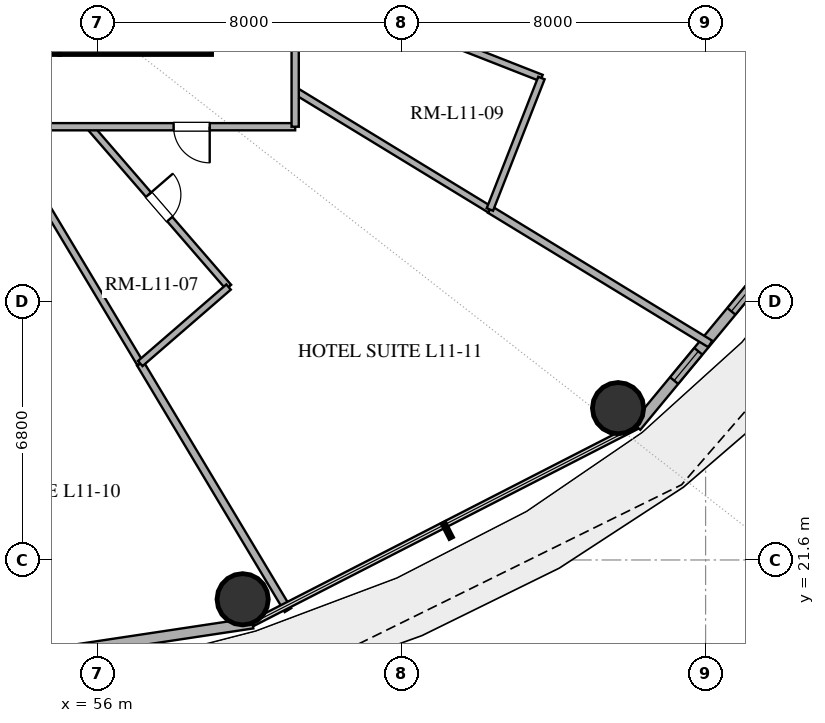
"""IFC4 building model, lengths in metres.
Left out: names, types, materials, properties, quantities, classifications, styles, units other than length and angle.
Written with IfcOpenShell. Run it as: python <this file> out.ifc"""

import sys

from ifc_helpers import new_model, si_unit, direction, frame, frame_2d, origin, origin_2d, place, context, subcontext, project, spatial, rectangle, hollow_circle, extrude, element, fill, save


model = new_model("IFC4")
c1 = context("Model", 3, precision=1e-05, world=origin(), true_north=direction((0.0, 1.0)))
c2 = subcontext(c1, "Body", "Model", "MODEL_VIEW")
j1 = project(units=[si_unit("LENGTHUNIT", "METRE"), si_unit("PLANEANGLEUNIT", "RADIAN")], contexts=[c1])
p1 = place(None, origin())
s1 = spatial("IfcSite", under=j1, at=p1, CompositionType="ELEMENT")
p2 = place(p1, origin())
s2 = spatial("IfcBuilding", under=s1, at=p2, CompositionType="ELEMENT")
p3 = place(p2, frame((0.0, 0.0, 49.8)))
s3 = spatial("IfcBuildingStorey", under=s2, at=p3, CompositionType="ELEMENT", Elevation=49.8)
p4 = place(p3, frame((41.0, 35.2, 0.0), z_axis=(0.0, 0.0, 1.0), x_axis=(1.0, 0.0, 0.0)))
e1 = element("IfcWall", 1, at=p4, inside=s3, PredefinedType="SHEAR", context=c2, shape_type="SweptSolid", body=[
    extrude(rectangle(XDim=14.0, YDim=0.6, at=frame_2d((7.0, 0.0))), origin(), (0.0, 0.0, 1.0), 3.38),
])
p5 = place(p4, frame((6.1, 0.0, 0.0)))
e2 = element("IfcOpeningElement", 2, at=p5, cuts=e1, PredefinedType="OPENING", context=c2, shape_type="SweptSolid", body=[
    extrude(rectangle(XDim=1.8, YDim=2.25, at=frame_2d((0.9, 1.125))), frame((0.0, 0.31, 0.0), z_axis=(0.0, -1.0, 0.0), x_axis=(1.0, 0.0, 0.0)), (0.0, 0.0, 1.0), 0.62),
])
p6 = place(p3, frame((55.0, 35.2, 0.0), z_axis=(0.0, 0.0, 1.0), x_axis=(1.0, 0.0, 0.0)))
e3 = element("IfcWall", 3, at=p6, inside=s3, PredefinedType="SHEAR", context=c2, shape_type="SweptSolid", body=[
    extrude(rectangle(XDim=4.0, YDim=0.6, at=frame_2d((2.0, 0.0))), origin(), (0.0, 0.0, 1.0), 3.38),
])
for number, where, z_axis, x_axis in (
    (4, (59.818, 20.566, 0.0), (0.0, 0.0, 1.0), (1.0, 0.0, 0.0)),
    (5, (69.697, 25.595, 0.0), (0.0, 0.0, 1.0), (1.0, 0.0, 0.0)),
):
    element("IfcColumn", number, at=place(p3, frame(where, z_axis=z_axis, x_axis=x_axis)), inside=s3, PredefinedType="COLUMN", context=c2, shape_type="SweptSolid", body=[
        extrude(hollow_circle(Radius=0.675, WallThickness=0.036, at=origin_2d()), origin(), (0.0, 0.0, 1.0), 3.38),
    ])
p7 = place(p3, frame((48.0, 18.12, 0.0), z_axis=(0.0, 0.0, 1.0), x_axis=(0.988864835849, 0.148816452121, 0.0)))
e6 = element("IfcWall", 6, at=p7, inside=s3, PredefinedType="SOLIDWALL", context=c2, shape_type="SweptSolid", body=[
    extrude(rectangle(XDim=12.214, YDim=0.28, at=frame_2d((6.107, 0.0))), origin(), (0.0, 0.0, 1.0), 3.38),
])
p8 = place(p7, frame((1.621, 0.0, 0.0)))
e7 = element("IfcOpeningElement", 7, at=p8, cuts=e6, PredefinedType="OPENING", context=c2, shape_type="SweptSolid", body=[
    extrude(rectangle(XDim=1.1, YDim=2.25, at=frame_2d((0.55, 1.125))), frame((0.0, 0.15, 0.0), z_axis=(0.0, -1.0, 0.0), x_axis=(1.0, 0.0, 0.0)), (0.0, 0.0, 1.0), 0.3),
])
p9 = place(p3, frame((70.174, 25.114, 0.0), z_axis=(0.0, 0.0, 1.0), x_axis=(0.637296809613, 0.770618437657, 0.0)))
e8 = element("IfcWall", 8, at=p9, inside=s3, PredefinedType="SOLIDWALL", context=c2, shape_type="SweptSolid", body=[
    extrude(rectangle(XDim=10.053, YDim=0.28, at=frame_2d((5.027, 0.0))), origin(), (0.0, 0.0, 1.0), 3.38),
])
p10 = place(p9, frame((1.565, 0.0, 0.85)))
e9 = element("IfcOpeningElement", 9, at=p10, cuts=e8, PredefinedType="OPENING", context=c2, shape_type="SweptSolid", body=[
    extrude(rectangle(XDim=1.0, YDim=1.8, at=frame_2d((0.5, 0.9))), frame((0.0, 0.15, 0.0), z_axis=(0.0, -1.0, 0.0), x_axis=(1.0, 0.0, 0.0)), (0.0, 0.0, 1.0), 0.3),
])
p11 = place(p9, frame((3.93, 0.0, 0.85)))
e10 = element("IfcOpeningElement", 10, at=p11, cuts=e8, PredefinedType="OPENING", context=c2, shape_type="SweptSolid", body=[
    extrude(rectangle(XDim=1.5, YDim=2.0, at=frame_2d((0.75, 1.0))), frame((0.0, 0.15, 0.0), z_axis=(0.0, -1.0, 0.0), x_axis=(1.0, 0.0, 0.0)), (0.0, 0.0, 1.0), 0.3),
])
p12 = place(p9, frame((6.196, 0.0, 0.85)))
e11 = element("IfcOpeningElement", 11, at=p12, cuts=e8, PredefinedType="OPENING", context=c2, shape_type="SweptSolid", body=[
    extrude(rectangle(XDim=1.5, YDim=2.0, at=frame_2d((0.75, 1.0))), frame((0.0, 0.15, 0.0), z_axis=(0.0, -1.0, 0.0), x_axis=(1.0, 0.0, 0.0)), (0.0, 0.0, 1.0), 0.3),
])
p13 = place(p3, frame((61.01, 20.281, 0.0), z_axis=(0.0, 0.0, 1.0), x_axis=(-0.513892719639, 0.857854458928, 0.0)))
e12 = element("IfcWall", 12, at=p13, inside=s3, PredefinedType="PARTITIONING", context=c2, shape_type="SweptSolid", body=[
    extrude(rectangle(XDim=7.563, YDim=0.2, at=frame_2d((3.781, 0.0))), origin(), (0.0, 0.0, 1.0), 2.74),
])
p14 = place(p3, frame((57.124, 26.769, 0.0), z_axis=(0.0, 0.0, 1.0), x_axis=(-0.513872793929, 0.857866394994, 0.0)))
e13 = element("IfcWall", 13, at=p14, inside=s3, PredefinedType="PLUMBINGWALL", context=c2, shape_type="SweptSolid", body=[
    extrude(rectangle(XDim=7.263, YDim=0.18, at=frame_2d((3.632, 0.0))), origin(), (0.0, 0.0, 1.0), 2.74),
])
p15 = place(p3, frame((61.2, 36.823, 0.0), z_axis=(0.0, 0.0, 1.0), x_axis=(0.930954264603, -0.365135806539, 0.0)))
e14 = element("IfcWall", 14, at=p15, inside=s3, PredefinedType="PLUMBINGWALL", context=c2, shape_type="SweptSolid", body=[
    extrude(rectangle(XDim=6.961, YDim=0.18, at=frame_2d((3.48, 0.0))), origin(), (0.0, 0.0, 1.0), 2.74),
])
p16 = place(p15, frame((3.055, 0.0, 0.0)))
e15 = element("IfcOpeningElement", 15, at=p16, cuts=e14, PredefinedType="OPENING", context=c2, shape_type="SweptSolid", body=[
    extrude(rectangle(XDim=0.85, YDim=2.1, at=frame_2d((0.425, 1.05))), frame((0.0, 0.1, 0.0), z_axis=(0.0, -1.0, 0.0), x_axis=(1.0, 0.0, 0.0)), (0.0, 0.0, 1.0), 0.2),
])
p17 = place(p3, frame((72.123, 27.284, 0.0), z_axis=(0.0, 0.0, 1.0), x_axis=(-0.853686673388, 0.520786965735, 0.0)))
e16 = element("IfcWall", 16, at=p17, inside=s3, PredefinedType="PARTITIONING", context=c2, shape_type="SweptSolid", body=[
    extrude(rectangle(XDim=6.793, YDim=0.2, at=frame_2d((3.396, 0.0))), origin(), (0.0, 0.0, 1.0), 2.74),
])
p18 = place(p3, frame((66.323, 30.822, 0.0), z_axis=(0.0, 0.0, 1.0), x_axis=(-0.853693843866, 0.52077521153, 0.0)))
e17 = element("IfcWall", 17, at=p18, inside=s3, PredefinedType="PLUMBINGWALL", context=c2, shape_type="SweptSolid", body=[
    extrude(rectangle(XDim=6.002, YDim=0.18, at=frame_2d((3.001, 0.0))), origin(), (0.0, 0.0, 1.0), 2.74),
])
p19 = place(p3, frame((55.794, 33.0, 0.0), z_axis=(0.0, 0.0, 1.0), x_axis=(0.654630697525, -0.755948840767, 0.0)))
e18 = element("IfcWall", 18, at=p19, inside=s3, PredefinedType="PLUMBINGWALL", context=c2, shape_type="SweptSolid", body=[
    extrude(rectangle(XDim=5.581, YDim=0.18, at=frame_2d((2.791, 0.0))), origin(), (0.0, 0.0, 1.0), 2.74),
])
p20 = place(p19, frame((2.365, 0.0, 0.0)))
e19 = element("IfcOpeningElement", 19, at=p20, cuts=e18, PredefinedType="OPENING", context=c2, shape_type="SweptSolid", body=[
    extrude(rectangle(XDim=0.85, YDim=2.1, at=frame_2d((0.425, 1.05))), frame((0.0, 0.1, 0.0), z_axis=(0.0, -1.0, 0.0), x_axis=(1.0, 0.0, 0.0)), (0.0, 0.0, 1.0), 0.2),
])
p21 = place(p3, frame((61.2, 33.0, 0.0), z_axis=(0.0, 0.0, 1.0), x_axis=(-1.0, 0.0, 0.0)))
e20 = element("IfcWall", 20, at=p21, inside=s3, PredefinedType="PARTITIONING", context=c2, shape_type="SweptSolid", body=[
    extrude(rectangle(XDim=7.846, YDim=0.19, at=frame_2d((3.923, 0.0))), origin(), (0.0, 0.0, 1.0), 2.74),
])
p22 = place(p21, frame((2.249, 0.0, 0.0)))
e21 = element("IfcOpeningElement", 21, at=p22, cuts=e20, PredefinedType="OPENING", context=c2, shape_type="SweptSolid", body=[
    extrude(rectangle(XDim=0.95, YDim=2.15, at=frame_2d((0.475, 1.075))), frame((0.0, 0.105, 0.0), z_axis=(0.0, -1.0, 0.0), x_axis=(1.0, 0.0, 0.0)), (0.0, 0.0, 1.0), 0.21),
])
p23 = place(p3, frame((61.2, 41.18, 0.0), z_axis=(0.0, 0.0, 1.0), x_axis=(0.0, -1.0, 0.0)))
e22 = element("IfcWall", 22, at=p23, inside=s3, PredefinedType="PARTITIONING", context=c2, shape_type="SweptSolid", body=[
    extrude(rectangle(XDim=8.18, YDim=0.19, at=frame_2d((4.09, 0.0))), origin(), (0.0, 0.0, 1.0), 2.74),
])
p24 = place(p23, frame((1.721, 0.0, 0.0)))
e23 = element("IfcOpeningElement", 23, at=p24, cuts=e22, PredefinedType="OPENING", context=c2, shape_type="SweptSolid", body=[
    extrude(rectangle(XDim=0.95, YDim=2.15, at=frame_2d((0.475, 1.075))), frame((0.0, 0.105, 0.0), z_axis=(0.0, -1.0, 0.0), x_axis=(1.0, 0.0, 0.0)), (0.0, 0.0, 1.0), 0.21),
])
p25 = place(p3, frame((67.68, 34.281, 0.0), z_axis=(0.0, 0.0, 1.0), x_axis=(-0.365174619735, -0.930939040486, 0.0)))
e24 = element("IfcWall", 24, at=p25, inside=s3, PredefinedType="PLUMBINGWALL", context=c2, shape_type="SweptSolid", body=[
    extrude(rectangle(XDim=3.716, YDim=0.18, at=frame_2d((1.858, 0.0))), origin(), (0.0, 0.0, 1.0), 2.74),
])
p26 = place(p3, frame((59.447, 28.781, 0.0), z_axis=(0.0, 0.0, 1.0), x_axis=(-0.755927521829, -0.654655315217, 0.0)))
e25 = element("IfcWall", 25, at=p26, inside=s3, PredefinedType="PLUMBINGWALL", context=c2, shape_type="SweptSolid", body=[
    extrude(rectangle(XDim=3.074, YDim=0.18, at=frame_2d((1.537, 0.0))), origin(), (0.0, 0.0, 1.0), 2.74),
])
p27 = place(p10, origin())
e26 = element("IfcWindow", 26, at=p27, inside=s3, PartitioningType="SINGLE_PANEL", PredefinedType="WINDOW", context=c2, shape_type="SweptSolid", body=[
    extrude(rectangle(XDim=1.0, YDim=1.8, at=frame_2d((0.5, 0.9))), frame((0.0, 0.03, 0.0), z_axis=(0.0, -1.0, 0.0), x_axis=(1.0, 0.0, 0.0)), (0.0, 0.0, 1.0), 0.06),
])
fill(e9, e26)
p28 = place(p11, origin())
e27 = element("IfcWindow", 27, at=p28, inside=s3, PartitioningType="SINGLE_PANEL", PredefinedType="WINDOW", context=c2, shape_type="SweptSolid", body=[
    extrude(rectangle(XDim=1.5, YDim=2.0, at=frame_2d((0.75, 1.0))), frame((0.0, 0.03, 0.0), z_axis=(0.0, -1.0, 0.0), x_axis=(1.0, 0.0, 0.0)), (0.0, 0.0, 1.0), 0.06),
])
fill(e10, e27)
p29 = place(p20, origin())
e28 = element("IfcDoor", 28, at=p29, inside=s3, OperationType="SINGLE_SWING_LEFT", PredefinedType="DOOR", context=c2, shape_type="SweptSolid", body=[
    extrude(rectangle(XDim=0.85, YDim=2.1, at=frame_2d((0.425, 1.05))), frame((0.0, 0.025, 0.0), z_axis=(0.0, -1.0, 0.0), x_axis=(1.0, 0.0, 0.0)), (0.0, 0.0, 1.0), 0.05),
])
fill(e19, e28)
p30 = place(p22, origin())
e29 = element("IfcDoor", 29, at=p30, inside=s3, OperationType="SINGLE_SWING_LEFT", PredefinedType="DOOR", context=c2, shape_type="SweptSolid", body=[
    extrude(rectangle(XDim=0.95, YDim=2.15, at=frame_2d((0.475, 1.075))), frame((0.0, 0.025, 0.0), z_axis=(0.0, -1.0, 0.0), x_axis=(1.0, 0.0, 0.0)), (0.0, 0.0, 1.0), 0.05),
])
fill(e21, e29)
save(model, sys.argv[1])
